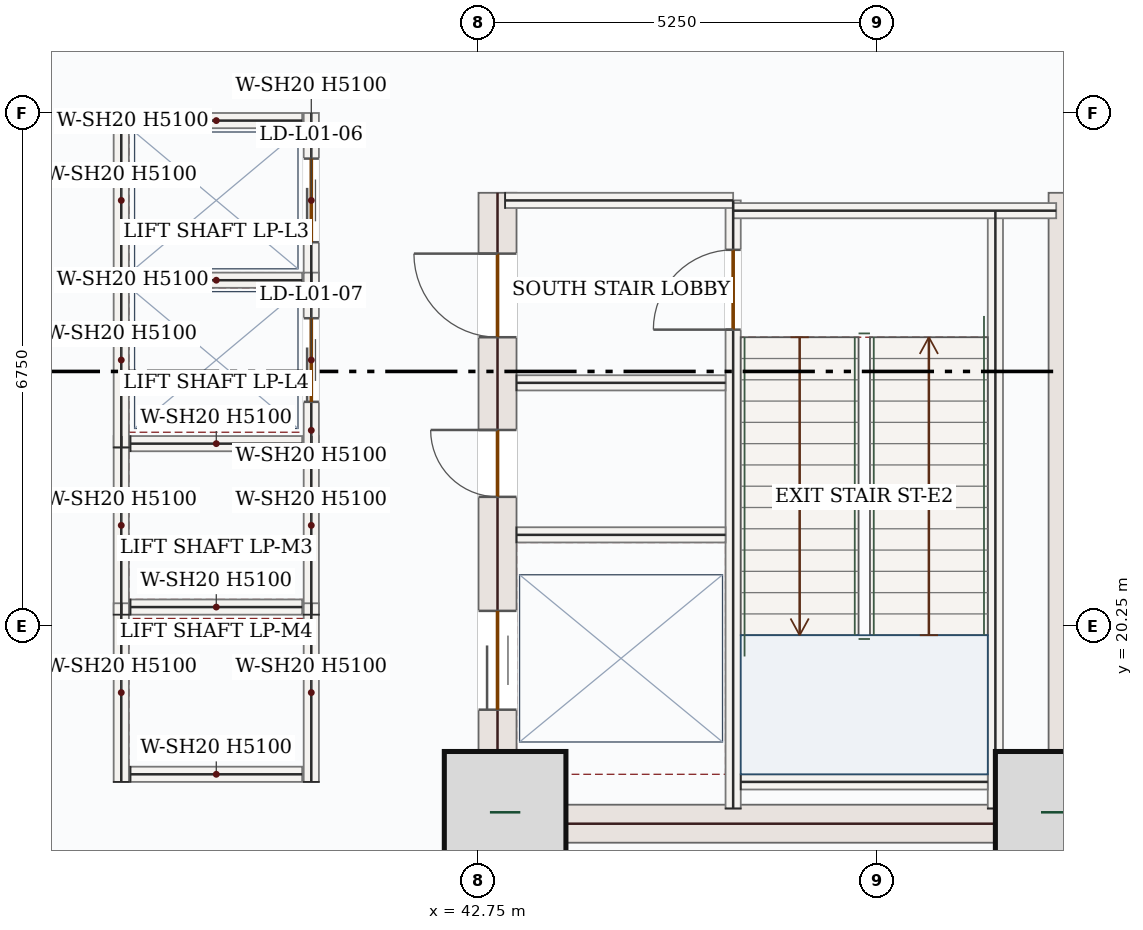
"""IFC4 building model, lengths in metres.
Left out: names, types, materials, properties, quantities, classifications, styles, units other than length and angle.
Written with IfcOpenShell. Run it as: python <this file> out.ifc"""

import sys

from ifc_helpers import new_model, si_unit, direction, frame, frame_2d, origin, origin_2d, place, context, subcontext, project, spatial, rectangle, extrude, source, transform, mapped, element, fill, save


model = new_model("IFC4")
c1 = context("Model", 3, precision=1e-05, world=origin(), true_north=direction((0.0, 1.0)))
c2 = subcontext(c1, "Body", "Model", "MODEL_VIEW")
j1 = project(units=[si_unit("LENGTHUNIT", "METRE"), si_unit("PLANEANGLEUNIT", "RADIAN")], contexts=[c1])
p1 = place(None, origin())
s1 = spatial("IfcSite", under=j1, at=p1, CompositionType="ELEMENT")
p2 = place(p1, origin())
s2 = spatial("IfcBuilding", under=s1, at=p2, CompositionType="ELEMENT")
p3 = place(p2, frame((0.0, 0.0, 7.2)))
s3 = spatial("IfcBuildingStorey", under=s2, at=p3, CompositionType="ELEMENT", Elevation=7.2)
p4 = place(p3, frame((43.0, 17.4, 0.0), z_axis=(0.0, 0.0, 1.0), x_axis=(0.0, 1.0, 0.0)))
e1 = element("IfcWall", 1, at=p4, inside=s3, PredefinedType="SHEAR", context=c2, shape_type="SweptSolid", body=[
    extrude(rectangle(XDim=8.55, YDim=0.5, at=frame_2d((4.275, 0.0))), origin(), (0.0, 0.0, 1.0), 5.1),
])
p5 = place(p4, frame((6.65, 0.0, 0.0)))
e2 = element("IfcOpeningElement", 2, at=p5, cuts=e1, PredefinedType="OPENING", context=c2, shape_type="SweptSolid", body=[
    extrude(rectangle(XDim=1.1, YDim=2.2, at=frame_2d((0.55, 1.1))), frame((0.0, 0.26, 0.0), z_axis=(0.0, -1.0, 0.0), x_axis=(1.0, 0.0, 0.0)), (0.0, 0.0, 1.0), 0.52),
])
p6 = place(p4, frame((1.75, 0.0, 0.0)))
e3 = element("IfcOpeningElement", 3, at=p6, cuts=e1, PredefinedType="OPENING", context=c2, shape_type="SweptSolid", body=[
    extrude(rectangle(XDim=1.3, YDim=2.2, at=frame_2d((0.65, 1.1))), frame((0.0, 0.26, 0.0), z_axis=(0.0, -1.0, 0.0), x_axis=(1.0, 0.0, 0.0)), (0.0, 0.0, 1.0), 0.52),
])
p7 = place(p4, frame((4.55, 0.0, 0.0)))
e4 = element("IfcOpeningElement", 4, at=p7, cuts=e1, PredefinedType="OPENING", context=c2, shape_type="SweptSolid", body=[
    extrude(rectangle(XDim=0.88, YDim=2.1, at=frame_2d((0.44, 1.05))), frame((0.0, 0.26, 0.0), z_axis=(0.0, -1.0, 0.0), x_axis=(1.0, 0.0, 0.0)), (0.0, 0.0, 1.0), 0.52),
])
m1 = source(origin(), c2, "Body", "SweptSolid", [
    extrude(rectangle(XDim=8.55, YDim=0.5, at=frame_2d((4.275, 0.0))), origin(), (0.0, 0.0, 1.0), 5.1),
])
p8 = place(p3, frame((50.5, 17.4, 0.0), z_axis=(0.0, 0.0, 1.0), x_axis=(0.0, 1.0, 0.0)))
e5 = element("IfcWall", 5, at=p8, inside=s3, PredefinedType="SHEAR", context=c2, shape_type="MappedRepresentation", body=[
    mapped(m1, transform((0.0, 0.0, 0.0), x_axis=(1.0, 0.0, 0.0), y_axis=(0.0, 1.0, 0.0), z_axis=(0.0, 0.0, 1.0), scale=1.0)),
])
m2 = source(origin(), c2, "Body", "SweptSolid", [
    extrude(rectangle(XDim=7.0, YDim=0.5, at=frame_2d((3.5, 0.0))), origin(), (0.0, 0.0, 1.0), 5.1),
])
p9 = place(p3, frame((43.25, 17.65, 0.0), z_axis=(0.0, 0.0, 1.0), x_axis=(1.0, 0.0, 0.0)))
e6 = element("IfcWall", 6, at=p9, inside=s3, PredefinedType="SHEAR", context=c2, shape_type="MappedRepresentation", body=[
    mapped(m2, transform((0.0, 0.0, 0.0), x_axis=(1.0, 0.0, 0.0), y_axis=(0.0, 1.0, 0.0), z_axis=(0.0, 0.0, 1.0), scale=1.0)),
])
m3 = source(origin(), c2, "Body", "SweptSolid", [
    extrude(rectangle(XDim=1.6, YDim=1.6, at=origin_2d()), origin(), (0.0, 0.0, 1.0), 5.4),
])
for number, where, z_axis, x_axis in (
    (7, (43.1, 17.8, 0.0), (0.0, 0.0, 1.0), (1.0, 0.0, 0.0)),
    (8, (50.35, 17.8, 0.0), (0.0, 0.0, 1.0), (1.0, 0.0, 0.0)),
):
    element("IfcColumn", number, at=place(p3, frame(where, z_axis=z_axis, x_axis=x_axis)), inside=s3, PredefinedType="COLUMN", context=c2, shape_type="MappedRepresentation", body=[
        mapped(m3, transform((0.0, 0.0, 0.0), x_axis=(1.0, 0.0, 0.0), y_axis=(0.0, 1.0, 0.0), z_axis=(0.0, 0.0, 1.0), scale=1.0)),
    ])
m4 = source(origin(), c2, "Body", "SweptSolid", [
    extrude(rectangle(XDim=7.87, YDim=0.2, at=frame_2d((3.935, 0.0))), origin(), (0.0, 0.0, 1.0), 5.1),
])
p10 = place(p3, frame((49.55, 17.85, 0.0), z_axis=(0.0, 0.0, 1.0), x_axis=(0.0, 1.0, 0.0)))
e9 = element("IfcWall", 9, at=p10, inside=s3, PredefinedType="SOLIDWALL", context=c2, shape_type="MappedRepresentation", body=[
    mapped(m4, transform((0.0, 0.0, 0.0), x_axis=(1.0, 0.0, 0.0), y_axis=(0.0, 1.0, 0.0), z_axis=(0.0, 0.0, 1.0), scale=1.0)),
])
p11 = place(p3, frame((46.1, 17.85, 0.0), z_axis=(0.0, 0.0, 1.0), x_axis=(0.0, 1.0, 0.0)))
e10 = element("IfcWall", 10, at=p11, inside=s3, PredefinedType="SOLIDWALL", context=c2, shape_type="SweptSolid", body=[
    extrude(rectangle(XDim=8.0, YDim=0.2, at=frame_2d((4.0, 0.0))), origin(), (0.0, 0.0, 1.0), 5.1),
])
p12 = place(p11, frame((6.3, 0.0, 0.0)))
e11 = element("IfcOpeningElement", 11, at=p12, cuts=e10, PredefinedType="OPENING", context=c2, shape_type="SweptSolid", body=[
    extrude(rectangle(XDim=1.05, YDim=2.15, at=frame_2d((0.525, 1.075))), frame((0.0, 0.11, 0.0), z_axis=(0.0, -1.0, 0.0), x_axis=(1.0, 0.0, 0.0)), (0.0, 0.0, 1.0), 0.22),
])
m5 = source(origin(), c2, "Body", "SweptSolid", [
    extrude(rectangle(XDim=3.0, YDim=0.2, at=frame_2d((1.5, 0.0))), origin(), (0.0, 0.0, 1.0), 5.1),
])
p13 = place(p3, frame((43.1, 25.85, 0.0), z_axis=(0.0, 0.0, 1.0), x_axis=(1.0, 0.0, 0.0)))
e12 = element("IfcWall", 12, at=p13, inside=s3, PredefinedType="SOLIDWALL", context=c2, shape_type="MappedRepresentation", body=[
    mapped(m5, transform((0.0, 0.0, 0.0), x_axis=(1.0, 0.0, 0.0), y_axis=(0.0, 1.0, 0.0), z_axis=(0.0, 0.0, 1.0), scale=1.0)),
])
m6 = source(origin(), c2, "Body", "SweptSolid", [
    extrude(rectangle(XDim=4.25, YDim=0.2, at=frame_2d((2.125, 0.0))), origin(), (0.0, 0.0, 1.0), 5.1),
])
p14 = place(p3, frame((46.1, 25.715, 0.0), z_axis=(0.0, 0.0, 1.0), x_axis=(1.0, 0.0, 0.0)))
e13 = element("IfcWall", 13, at=p14, inside=s3, PredefinedType="SOLIDWALL", context=c2, shape_type="MappedRepresentation", body=[
    mapped(m6, transform((0.0, 0.0, 0.0), x_axis=(1.0, 0.0, 0.0), y_axis=(0.0, 1.0, 0.0), z_axis=(0.0, 0.0, 1.0), scale=1.0)),
])
m7 = source(origin(), c2, "Body", "SweptSolid", [
    extrude(rectangle(XDim=3.25, YDim=0.2, at=frame_2d((1.625, 0.0))), origin(), (0.0, 0.0, 1.0), 5.1),
])
p15 = place(p3, frame((46.2, 18.2, 0.0), z_axis=(0.0, 0.0, 1.0), x_axis=(1.0, 0.0, 0.0)))
e14 = element("IfcWall", 14, at=p15, inside=s3, PredefinedType="SOLIDWALL", context=c2, shape_type="MappedRepresentation", body=[
    mapped(m7, transform((0.0, 0.0, 0.0), x_axis=(1.0, 0.0, 0.0), y_axis=(0.0, 1.0, 0.0), z_axis=(0.0, 0.0, 1.0), scale=1.0)),
])
m8 = source(origin(), c2, "Body", "SweptSolid", [
    extrude(rectangle(XDim=2.75, YDim=0.2, at=frame_2d((1.375, 0.0))), origin(), (0.0, 0.0, 1.0), 5.1),
])
for number, where, z_axis, x_axis in (
    (15, (43.25, 23.45, 0.0), (0.0, 0.0, 1.0), (1.0, 0.0, 0.0)),
    (16, (43.25, 21.45, 0.0), (0.0, 0.0, 1.0), (1.0, 0.0, 0.0)),
):
    element("IfcWall", number, at=place(p3, frame(where, z_axis=z_axis, x_axis=x_axis)), inside=s3, PredefinedType="SOLIDWALL", context=c2, shape_type="MappedRepresentation", body=[
        mapped(m8, transform((0.0, 0.0, 0.0), x_axis=(1.0, 0.0, 0.0), y_axis=(0.0, 1.0, 0.0), z_axis=(0.0, 0.0, 1.0), scale=1.0)),
    ])
m9 = source(origin(), c2, "Body", "SweptSolid", [
    extrude(rectangle(XDim=2.35, YDim=0.2, at=frame_2d((1.175, 0.0))), origin(), (0.0, 0.0, 1.0), 5.1),
])
for number, where, z_axis, x_axis in (
    (17, (38.05, 20.4, 0.0), (0.0, 0.0, 1.0), (0.0, 1.0, 0.0)),
    (18, (40.55, 20.4, 0.0), (0.0, 0.0, 1.0), (0.0, 1.0, 0.0)),
):
    element("IfcWall", number, at=place(p3, frame(where, z_axis=z_axis, x_axis=x_axis)), inside=s3, PredefinedType="SOLIDWALL", context=c2, shape_type="MappedRepresentation", body=[
        mapped(m9, transform((0.0, 0.0, 0.0), x_axis=(1.0, 0.0, 0.0), y_axis=(0.0, 1.0, 0.0), z_axis=(0.0, 0.0, 1.0), scale=1.0)),
    ])
m10 = source(origin(), c2, "Body", "SweptSolid", [
    extrude(rectangle(XDim=2.26, YDim=0.2, at=frame_2d((1.13, 0.0))), origin(), (0.0, 0.0, 1.0), 5.1),
])
for number, where, z_axis, x_axis in (
    (19, (38.17, 20.5, 0.0), (0.0, 0.0, 1.0), (1.0, 0.0, 0.0)),
    (20, (38.17, 22.65, 0.0), (0.0, 0.0, 1.0), (1.0, 0.0, 0.0)),
):
    element("IfcWall", number, at=place(p3, frame(where, z_axis=z_axis, x_axis=x_axis)), inside=s3, PredefinedType="SOLIDWALL", context=c2, shape_type="MappedRepresentation", body=[
        mapped(m10, transform((0.0, 0.0, 0.0), x_axis=(1.0, 0.0, 0.0), y_axis=(0.0, 1.0, 0.0), z_axis=(0.0, 0.0, 1.0), scale=1.0)),
    ])
for number, where, z_axis, x_axis in (
    (21, (38.05, 18.2, 0.0), (0.0, 0.0, 1.0), (0.0, 1.0, 0.0)),
    (22, (40.55, 18.2, 0.0), (0.0, 0.0, 1.0), (0.0, 1.0, 0.0)),
):
    element("IfcWall", number, at=place(p3, frame(where, z_axis=z_axis, x_axis=x_axis)), inside=s3, PredefinedType="SOLIDWALL", context=c2, shape_type="MappedRepresentation", body=[
        mapped(m9, transform((0.0, 0.0, 0.0), x_axis=(1.0, 0.0, 0.0), y_axis=(0.0, 1.0, 0.0), z_axis=(0.0, 0.0, 1.0), scale=1.0)),
    ])
p16 = place(p3, frame((38.17, 18.3, 0.0), z_axis=(0.0, 0.0, 1.0), x_axis=(1.0, 0.0, 0.0)))
e23 = element("IfcWall", 23, at=p16, inside=s3, PredefinedType="SOLIDWALL", context=c2, shape_type="MappedRepresentation", body=[
    mapped(m10, transform((0.0, 0.0, 0.0), x_axis=(1.0, 0.0, 0.0), y_axis=(0.0, 1.0, 0.0), z_axis=(0.0, 0.0, 1.0), scale=1.0)),
])
m11 = source(origin(), c2, "Body", "SweptSolid", [
    extrude(rectangle(XDim=2.3, YDim=0.2, at=frame_2d((1.15, 0.0))), origin(), (0.0, 0.0, 1.0), 5.1),
])
p17 = place(p3, frame((38.05, 24.7, 0.0), z_axis=(0.0, 0.0, 1.0), x_axis=(0.0, 1.0, 0.0)))
e24 = element("IfcWall", 24, at=p17, inside=s3, PredefinedType="SOLIDWALL", context=c2, shape_type="MappedRepresentation", body=[
    mapped(m11, transform((0.0, 0.0, 0.0), x_axis=(1.0, 0.0, 0.0), y_axis=(0.0, 1.0, 0.0), z_axis=(0.0, 0.0, 1.0), scale=1.0)),
])
p18 = place(p3, frame((40.55, 24.7, 0.0), z_axis=(0.0, 0.0, 1.0), x_axis=(0.0, 1.0, 0.0)))
e25 = element("IfcWall", 25, at=p18, inside=s3, PredefinedType="SOLIDWALL", context=c2, shape_type="SweptSolid", body=[
    extrude(rectangle(XDim=2.3, YDim=0.2, at=frame_2d((1.15, 0.0))), origin(), (0.0, 0.0, 1.0), 5.1),
])
p19 = place(p18, frame((0.6, 0.0, 0.0)))
e26 = element("IfcOpeningElement", 26, at=p19, cuts=e25, PredefinedType="OPENING", context=c2, shape_type="SweptSolid", body=[
    extrude(rectangle(XDim=1.1, YDim=2.15, at=frame_2d((0.55, 1.075))), frame((0.0, 0.11, 0.0), z_axis=(0.0, -1.0, 0.0), x_axis=(1.0, 0.0, 0.0)), (0.0, 0.0, 1.0), 0.22),
])
for number, where, z_axis, x_axis in (
    (27, (38.17, 24.8, 0.0), (0.0, 0.0, 1.0), (1.0, 0.0, 0.0)),
    (28, (38.17, 26.9, 0.0), (0.0, 0.0, 1.0), (1.0, 0.0, 0.0)),
):
    element("IfcWall", number, at=place(p3, frame(where, z_axis=z_axis, x_axis=x_axis)), inside=s3, PredefinedType="SOLIDWALL", context=c2, shape_type="MappedRepresentation", body=[
        mapped(m10, transform((0.0, 0.0, 0.0), x_axis=(1.0, 0.0, 0.0), y_axis=(0.0, 1.0, 0.0), z_axis=(0.0, 0.0, 1.0), scale=1.0)),
    ])
m12 = source(origin(), c2, "Body", "SweptSolid", [
    extrude(rectangle(XDim=2.3, YDim=0.2, at=frame_2d((1.15, 0.0))), origin(), (0.0, 0.0, 1.0), 5.1),
])
p20 = place(p3, frame((38.05, 22.6, 0.0), z_axis=(0.0, 0.0, 1.0), x_axis=(0.0, 1.0, 0.0)))
e29 = element("IfcWall", 29, at=p20, inside=s3, PredefinedType="SOLIDWALL", context=c2, shape_type="MappedRepresentation", body=[
    mapped(m12, transform((0.0, 0.0, 0.0), x_axis=(1.0, 0.0, 0.0), y_axis=(0.0, 1.0, 0.0), z_axis=(0.0, 0.0, 1.0), scale=1.0)),
])
p21 = place(p3, frame((40.55, 22.6, 0.0), z_axis=(0.0, 0.0, 1.0), x_axis=(0.0, 1.0, 0.0)))
e30 = element("IfcWall", 30, at=p21, inside=s3, PredefinedType="SOLIDWALL", context=c2, shape_type="SweptSolid", body=[
    extrude(rectangle(XDim=2.3, YDim=0.2, at=frame_2d((1.15, 0.0))), origin(), (0.0, 0.0, 1.0), 5.1),
])
p22 = place(p21, frame((0.6, 0.0, 0.0)))
e31 = element("IfcOpeningElement", 31, at=p22, cuts=e30, PredefinedType="OPENING", context=c2, shape_type="SweptSolid", body=[
    extrude(rectangle(XDim=1.1, YDim=2.15, at=frame_2d((0.55, 1.075))), frame((0.0, 0.11, 0.0), z_axis=(0.0, -1.0, 0.0), x_axis=(1.0, 0.0, 0.0)), (0.0, 0.0, 1.0), 0.22),
])
m13 = source(origin(), c2, "Body", "SweptSolid", [
    extrude(rectangle(XDim=1.05, YDim=2.15, at=frame_2d((0.525, 1.075))), frame((0.0, 0.025, 0.0), z_axis=(0.0, -1.0, 0.0), x_axis=(1.0, 0.0, 0.0)), (0.0, 0.0, 1.0), 0.05),
])
p23 = place(p12, origin())
e32 = element("IfcDoor", 32, at=p23, inside=s3, OperationType="SINGLE_SWING_LEFT", PredefinedType="DOOR", context=c2, shape_type="MappedRepresentation", body=[
    mapped(m13, transform((0.0, 0.0, 0.0), x_axis=(1.0, 0.0, 0.0), y_axis=(0.0, 1.0, 0.0), z_axis=(0.0, 0.0, 1.0), scale=1.0)),
])
fill(e11, e32)
m14 = source(origin(), c2, "Body", "SweptSolid", [
    extrude(rectangle(XDim=1.1, YDim=2.2, at=frame_2d((0.55, 1.1))), frame((0.0, 0.025, 0.0), z_axis=(0.0, -1.0, 0.0), x_axis=(1.0, 0.0, 0.0)), (0.0, 0.0, 1.0), 0.05),
])
p24 = place(p5, origin())
e33 = element("IfcDoor", 33, at=p24, inside=s3, OperationType="SINGLE_SWING_RIGHT", PredefinedType="DOOR", context=c2, shape_type="MappedRepresentation", body=[
    mapped(m14, transform((0.0, 0.0, 0.0), x_axis=(1.0, 0.0, 0.0), y_axis=(0.0, 1.0, 0.0), z_axis=(0.0, 0.0, 1.0), scale=1.0)),
])
fill(e2, e33)
m15 = source(origin(), c2, "Body", "SweptSolid", [
    extrude(rectangle(XDim=1.3, YDim=2.2, at=frame_2d((0.65, 1.1))), frame((0.0, 0.025, 0.0), z_axis=(0.0, -1.0, 0.0), x_axis=(1.0, 0.0, 0.0)), (0.0, 0.0, 1.0), 0.05),
])
p25 = place(p6, origin())
e34 = element("IfcDoor", 34, at=p25, inside=s3, OperationType="DOUBLE_DOOR_SLIDING", PredefinedType="DOOR", context=c2, shape_type="MappedRepresentation", body=[
    mapped(m15, transform((0.0, 0.0, 0.0), x_axis=(1.0, 0.0, 0.0), y_axis=(0.0, 1.0, 0.0), z_axis=(0.0, 0.0, 1.0), scale=1.0)),
])
fill(e3, e34)
m16 = source(origin(), c2, "Body", "SweptSolid", [
    extrude(rectangle(XDim=0.88, YDim=2.1, at=frame_2d((0.44, 1.05))), frame((0.0, 0.025, 0.0), z_axis=(0.0, -1.0, 0.0), x_axis=(1.0, 0.0, 0.0)), (0.0, 0.0, 1.0), 0.05),
])
p26 = place(p7, origin())
e35 = element("IfcDoor", 35, at=p26, inside=s3, OperationType="SINGLE_SWING_RIGHT", PredefinedType="DOOR", context=c2, shape_type="MappedRepresentation", body=[
    mapped(m16, transform((0.0, 0.0, 0.0), x_axis=(1.0, 0.0, 0.0), y_axis=(0.0, 1.0, 0.0), z_axis=(0.0, 0.0, 1.0), scale=1.0)),
])
fill(e4, e35)
m17 = source(origin(), c2, "Body", "SweptSolid", [
    extrude(rectangle(XDim=1.1, YDim=2.15, at=frame_2d((0.55, 1.075))), frame((0.0, 0.025, 0.0), z_axis=(0.0, -1.0, 0.0), x_axis=(1.0, 0.0, 0.0)), (0.0, 0.0, 1.0), 0.05),
])
p27 = place(p19, origin())
e36 = element("IfcDoor", 36, at=p27, inside=s3, OperationType="DOUBLE_DOOR_SLIDING", PredefinedType="DOOR", context=c2, shape_type="MappedRepresentation", body=[
    mapped(m17, transform((0.0, 0.0, 0.0), x_axis=(1.0, 0.0, 0.0), y_axis=(0.0, 1.0, 0.0), z_axis=(0.0, 0.0, 1.0), scale=1.0)),
])
fill(e26, e36)
p28 = place(p22, origin())
e37 = element("IfcDoor", 37, at=p28, inside=s3, OperationType="DOUBLE_DOOR_SLIDING", PredefinedType="DOOR", context=c2, shape_type="MappedRepresentation", body=[
    mapped(m17, transform((0.0, 0.0, 0.0), x_axis=(1.0, 0.0, 0.0), y_axis=(0.0, 1.0, 0.0), z_axis=(0.0, 0.0, 1.0), scale=1.0)),
])
fill(e31, e37)
save(model, sys.argv[1])
